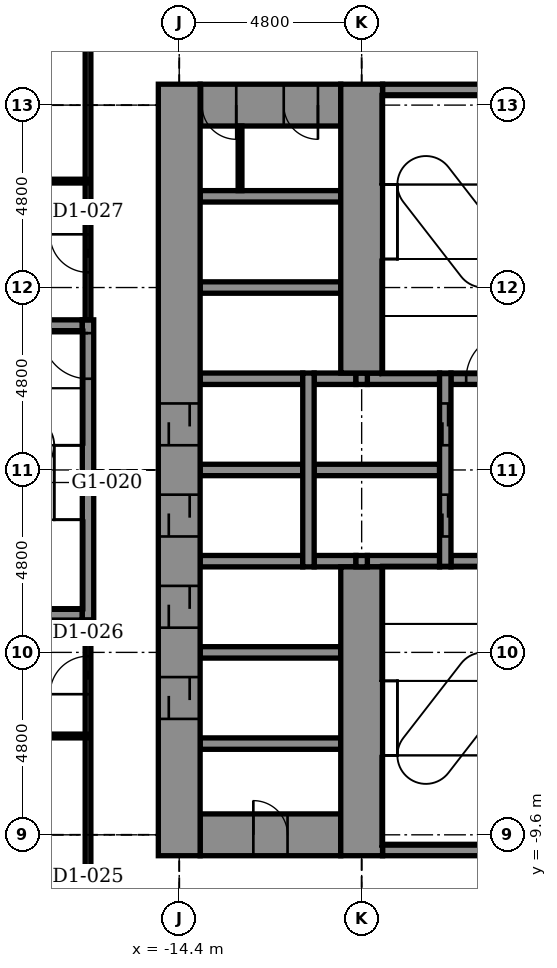
"""IFC4 building model, lengths in metres.
Left out: names, types, materials, properties, quantities, classifications, styles, units other than length and angle.
Written with IfcOpenShell. Run it as: python <this file> out.ifc"""

import sys

from ifc_helpers import new_model, si_unit, direction, frame, frame_2d, origin, place, context, subcontext, project, spatial, rectangle, extrude, element, fill, save


model = new_model("IFC4")
c1 = context("Model", 3, precision=1e-05, world=origin(), true_north=direction((0.0, 1.0)))
c2 = subcontext(c1, "Body", "Model", "MODEL_VIEW")
j1 = project(units=[si_unit("LENGTHUNIT", "METRE"), si_unit("PLANEANGLEUNIT", "RADIAN")], contexts=[c1])
p1 = place(None, origin())
s1 = spatial("IfcSite", under=j1, at=p1, CompositionType="ELEMENT")
p2 = place(p1, origin())
s2 = spatial("IfcBuilding", under=s1, at=p2, CompositionType="ELEMENT")
p3 = place(p2, frame((0.0, 0.0, 7.0)))
s3 = spatial("IfcBuildingStorey", under=s2, at=p3, CompositionType="ELEMENT", Elevation=7.0)
p4 = place(p3, frame((-9.05, -10.0, -0.3), z_axis=(0.0, 0.0, 1.0), x_axis=(1.0, 0.0, 0.0)))
e1 = element("IfcWall", 1, at=p4, inside=s3, PredefinedType="STANDARD", context=c2, shape_type="SweptSolid", body=[
    extrude(rectangle(XDim=3.8, YDim=0.3, at=frame_2d((1.9, 0.0))), origin(), (0.0, 0.0, 1.0), 5.4),
])
p5 = place(p3, frame((-13.85, -9.6, -0.3), z_axis=(0.0, 0.0, 1.0), x_axis=(1.0, 0.0, 0.0)))
e2 = element("IfcWall", 2, at=p5, inside=s3, PredefinedType="SHEAR", context=c2, shape_type="SweptSolid", body=[
    extrude(rectangle(XDim=3.7, YDim=1.1, at=frame_2d((1.85, 0.0))), origin(), (0.0, 0.0, 1.0), 5.4),
])
p6 = place(p5, frame((1.4, 0.0, 0.3)))
e3 = element("IfcOpeningElement", 3, at=p6, cuts=e2, PredefinedType="OPENING", context=c2, shape_type="SweptSolid", body=[
    extrude(rectangle(XDim=0.9, YDim=2.1, at=frame_2d((0.45, 1.05))), frame((0.0, 0.56, 0.0), z_axis=(0.0, -1.0, 0.0), x_axis=(1.0, 0.0, 0.0)), (0.0, 0.0, 1.0), 1.12),
])
for number, where, z_axis, x_axis in (
    (4, (-13.85, -7.2, -0.3), (0.0, 0.0, 1.0), (1.0, 0.0, 0.0)),
    (5, (-13.85, -4.8, -0.3), (0.0, 0.0, 1.0), (1.0, 0.0, 0.0)),
):
    element("IfcWall", number, at=place(p3, frame(where, z_axis=z_axis, x_axis=x_axis)), inside=s3, PredefinedType="STANDARD", context=c2, shape_type="SweptSolid", body=[
        extrude(rectangle(XDim=3.7, YDim=0.3, at=frame_2d((1.85, 0.0))), origin(), (0.0, 0.0, 1.0), 5.4),
    ])
p7 = place(p3, frame((-21.45, -3.8, -0.3), z_axis=(0.0, 0.0, 1.0), x_axis=(1.0, 0.0, 0.0)))
e6 = element("IfcWall", 6, at=p7, inside=s3, PredefinedType="STANDARD", context=c2, shape_type="SweptSolid", body=[
    extrude(rectangle(XDim=4.5, YDim=0.3, at=frame_2d((2.25, 0.0))), origin(), (0.0, 0.0, 1.0), 5.4),
])
p8 = place(p3, frame((-13.85, -2.4, -0.3), z_axis=(0.0, 0.0, 1.0), x_axis=(1.0, 0.0, 0.0)))
e7 = element("IfcWall", 7, at=p8, inside=s3, PredefinedType="STANDARD", context=c2, shape_type="SweptSolid", body=[
    extrude(rectangle(XDim=2.7, YDim=0.3, at=frame_2d((1.35, 0.0))), origin(), (0.0, 0.0, 1.0), 5.4),
])
p9 = place(p3, frame((-10.85, -2.4, -0.3), z_axis=(0.0, 0.0, 1.0), x_axis=(1.0, 0.0, 0.0)))
e8 = element("IfcWall", 8, at=p9, inside=s3, PredefinedType="STANDARD", context=c2, shape_type="SweptSolid", body=[
    extrude(rectangle(XDim=1.1, YDim=0.3, at=frame_2d((0.55, 0.0))), origin(), (0.0, 0.0, 1.0), 5.4),
])
p10 = place(p3, frame((-9.45, -2.4, -0.3), z_axis=(0.0, 0.0, 1.0), x_axis=(1.0, 0.0, 0.0)))
e9 = element("IfcWall", 9, at=p10, inside=s3, PredefinedType="STANDARD", context=c2, shape_type="SweptSolid", body=[
    extrude(rectangle(XDim=1.9, YDim=0.3, at=frame_2d((0.95, 0.0))), origin(), (0.0, 0.0, 1.0), 5.4),
])
p11 = place(p3, frame((-7.25, -2.4, -0.3), z_axis=(0.0, 0.0, 1.0), x_axis=(1.0, 0.0, 0.0)))
e10 = element("IfcWall", 10, at=p11, inside=s3, PredefinedType="STANDARD", context=c2, shape_type="SweptSolid", body=[
    extrude(rectangle(XDim=2.0, YDim=0.3, at=frame_2d((1.0, 0.0))), origin(), (0.0, 0.0, 1.0), 5.4),
])
p12 = place(p3, frame((-13.85, 0.0, -0.3), z_axis=(0.0, 0.0, 1.0), x_axis=(1.0, 0.0, 0.0)))
e11 = element("IfcWall", 11, at=p12, inside=s3, PredefinedType="STANDARD", context=c2, shape_type="SweptSolid", body=[
    extrude(rectangle(XDim=2.7, YDim=0.3, at=frame_2d((1.35, 0.0))), origin(), (0.0, 0.0, 1.0), 5.4),
])
p13 = place(p3, frame((-10.85, 0.0, -0.3), z_axis=(0.0, 0.0, 1.0), x_axis=(1.0, 0.0, 0.0)))
e12 = element("IfcWall", 12, at=p13, inside=s3, PredefinedType="STANDARD", context=c2, shape_type="SweptSolid", body=[
    extrude(rectangle(XDim=3.3, YDim=0.3, at=frame_2d((1.65, 0.0))), origin(), (0.0, 0.0, 1.0), 5.4),
])
p14 = place(p3, frame((-13.85, 2.4, -0.3), z_axis=(0.0, 0.0, 1.0), x_axis=(1.0, 0.0, 0.0)))
e13 = element("IfcWall", 13, at=p14, inside=s3, PredefinedType="STANDARD", context=c2, shape_type="SweptSolid", body=[
    extrude(rectangle(XDim=2.7, YDim=0.3, at=frame_2d((1.35, 0.0))), origin(), (0.0, 0.0, 1.0), 5.4),
])
p15 = place(p3, frame((-10.85, 2.4, -0.3), z_axis=(0.0, 0.0, 1.0), x_axis=(1.0, 0.0, 0.0)))
e14 = element("IfcWall", 14, at=p15, inside=s3, PredefinedType="STANDARD", context=c2, shape_type="SweptSolid", body=[
    extrude(rectangle(XDim=1.1, YDim=0.3, at=frame_2d((0.55, 0.0))), origin(), (0.0, 0.0, 1.0), 5.4),
])
p16 = place(p3, frame((-9.45, 2.4, -0.3), z_axis=(0.0, 0.0, 1.0), x_axis=(1.0, 0.0, 0.0)))
e15 = element("IfcWall", 15, at=p16, inside=s3, PredefinedType="STANDARD", context=c2, shape_type="SweptSolid", body=[
    extrude(rectangle(XDim=1.9, YDim=0.3, at=frame_2d((0.95, 0.0))), origin(), (0.0, 0.0, 1.0), 5.4),
])
p17 = place(p3, frame((-7.25, 2.4, -0.3), z_axis=(0.0, 0.0, 1.0), x_axis=(1.0, 0.0, 0.0)))
e16 = element("IfcWall", 16, at=p17, inside=s3, PredefinedType="STANDARD", context=c2, shape_type="SweptSolid", body=[
    extrude(rectangle(XDim=2.0, YDim=0.3, at=frame_2d((1.0, 0.0))), origin(), (0.0, 0.0, 1.0), 5.4),
])
p18 = place(p17, frame((0.4, 0.0, 0.3)))
e17 = element("IfcOpeningElement", 17, at=p18, cuts=e16, PredefinedType="OPENING", context=c2, shape_type="SweptSolid", body=[
    extrude(rectangle(XDim=1.2, YDim=2.1, at=frame_2d((0.6, 1.05))), frame((0.0, 0.16, 0.0), z_axis=(0.0, -1.0, 0.0), x_axis=(1.0, 0.0, 0.0)), (0.0, 0.0, 1.0), 0.32),
])
p19 = place(p3, frame((-21.45, 3.8, -0.3), z_axis=(0.0, 0.0, 1.0), x_axis=(1.0, 0.0, 0.0)))
e18 = element("IfcWall", 18, at=p19, inside=s3, PredefinedType="STANDARD", context=c2, shape_type="SweptSolid", body=[
    extrude(rectangle(XDim=4.5, YDim=0.3, at=frame_2d((2.25, 0.0))), origin(), (0.0, 0.0, 1.0), 5.4),
])
for number, where, z_axis, x_axis in (
    (19, (-13.85, 4.8, -0.3), (0.0, 0.0, 1.0), (1.0, 0.0, 0.0)),
    (20, (-13.85, 7.2, -0.3), (0.0, 0.0, 1.0), (1.0, 0.0, 0.0)),
):
    element("IfcWall", number, at=place(p3, frame(where, z_axis=z_axis, x_axis=x_axis)), inside=s3, PredefinedType="STANDARD", context=c2, shape_type="SweptSolid", body=[
        extrude(rectangle(XDim=3.7, YDim=0.3, at=frame_2d((1.85, 0.0))), origin(), (0.0, 0.0, 1.0), 5.4),
    ])
p20 = place(p3, frame((-13.85, 9.6, -0.3), z_axis=(0.0, 0.0, 1.0), x_axis=(1.0, 0.0, 0.0)))
e21 = element("IfcWall", 21, at=p20, inside=s3, PredefinedType="SHEAR", context=c2, shape_type="SweptSolid", body=[
    extrude(rectangle(XDim=3.7, YDim=1.1, at=frame_2d((1.85, 0.0))), origin(), (0.0, 0.0, 1.0), 5.4),
])
p21 = place(p20, frame((0.05, 0.0, 0.3)))
e22 = element("IfcOpeningElement", 22, at=p21, cuts=e21, PredefinedType="OPENING", context=c2, shape_type="SweptSolid", body=[
    extrude(rectangle(XDim=0.9, YDim=2.1, at=frame_2d((0.45, 1.05))), frame((0.0, 0.56, 0.0), z_axis=(0.0, -1.0, 0.0), x_axis=(1.0, 0.0, 0.0)), (0.0, 0.0, 1.0), 1.12),
])
p22 = place(p20, frame((2.2, 0.0, 0.3)))
e23 = element("IfcOpeningElement", 23, at=p22, cuts=e21, PredefinedType="OPENING", context=c2, shape_type="SweptSolid", body=[
    extrude(rectangle(XDim=0.9, YDim=2.1, at=frame_2d((0.45, 1.05))), frame((0.0, 0.56, 0.0), z_axis=(0.0, -1.0, 0.0), x_axis=(1.0, 0.0, 0.0)), (0.0, 0.0, 1.0), 1.12),
])
p23 = place(p3, frame((-9.05, 10.0, -0.3), z_axis=(0.0, 0.0, 1.0), x_axis=(1.0, 0.0, 0.0)))
e24 = element("IfcWall", 24, at=p23, inside=s3, PredefinedType="STANDARD", context=c2, shape_type="SweptSolid", body=[
    extrude(rectangle(XDim=3.8, YDim=0.3, at=frame_2d((1.9, 0.0))), origin(), (0.0, 0.0, 1.0), 5.4),
])
p24 = place(p3, frame((-16.8, -3.95, -0.3), z_axis=(0.0, 0.0, 1.0), x_axis=(0.0, 1.0, 0.0)))
e25 = element("IfcWall", 25, at=p24, inside=s3, PredefinedType="STANDARD", context=c2, shape_type="SweptSolid", body=[
    extrude(rectangle(XDim=7.9, YDim=0.3, at=frame_2d((3.95, 0.0))), origin(), (0.0, 0.0, 1.0), 5.4),
])
p25 = place(p24, frame((6.35, 0.0, 0.3)))
e26 = element("IfcOpeningElement", 26, at=p25, cuts=e25, PredefinedType="OPENING", context=c2, shape_type="SweptSolid", body=[
    extrude(rectangle(XDim=1.2, YDim=2.1, at=frame_2d((0.6, 1.05))), frame((0.0, 0.16, 0.0), z_axis=(0.0, -1.0, 0.0), x_axis=(1.0, 0.0, 0.0)), (0.0, 0.0, 1.0), 0.32),
])
p26 = place(p3, frame((-14.4, -10.15, -0.3), z_axis=(0.0, 0.0, 1.0), x_axis=(0.0, 1.0, 0.0)))
e27 = element("IfcWall", 27, at=p26, inside=s3, PredefinedType="SHEAR", context=c2, shape_type="SweptSolid", body=[
    extrude(rectangle(XDim=20.3, YDim=1.1, at=frame_2d((10.15, 0.0))), origin(), (0.0, 0.0, 1.0), 5.4),
])
p27 = place(p26, frame((3.6, 0.0, 0.3)))
e28 = element("IfcOpeningElement", 28, at=p27, cuts=e27, PredefinedType="OPENING", context=c2, shape_type="SweptSolid", body=[
    extrude(rectangle(XDim=1.1, YDim=2.1, at=frame_2d((0.55, 1.05))), frame((0.0, 0.56, 0.0), z_axis=(0.0, -1.0, 0.0), x_axis=(1.0, 0.0, 0.0)), (0.0, 0.0, 1.0), 1.12),
])
p28 = place(p26, frame((6.0, 0.0, 0.3)))
e29 = element("IfcOpeningElement", 29, at=p28, cuts=e27, PredefinedType="OPENING", context=c2, shape_type="SweptSolid", body=[
    extrude(rectangle(XDim=1.1, YDim=2.1, at=frame_2d((0.55, 1.05))), frame((0.0, 0.56, 0.0), z_axis=(0.0, -1.0, 0.0), x_axis=(1.0, 0.0, 0.0)), (0.0, 0.0, 1.0), 1.12),
])
p29 = place(p26, frame((8.4, 0.0, 0.3)))
e30 = element("IfcOpeningElement", 30, at=p29, cuts=e27, PredefinedType="OPENING", context=c2, shape_type="SweptSolid", body=[
    extrude(rectangle(XDim=1.1, YDim=2.1, at=frame_2d((0.55, 1.05))), frame((0.0, 0.56, 0.0), z_axis=(0.0, -1.0, 0.0), x_axis=(1.0, 0.0, 0.0)), (0.0, 0.0, 1.0), 1.12),
])
p30 = place(p26, frame((10.8, 0.0, 0.3)))
e31 = element("IfcOpeningElement", 31, at=p30, cuts=e27, PredefinedType="OPENING", context=c2, shape_type="SweptSolid", body=[
    extrude(rectangle(XDim=1.1, YDim=2.1, at=frame_2d((0.55, 1.05))), frame((0.0, 0.56, 0.0), z_axis=(0.0, -1.0, 0.0), x_axis=(1.0, 0.0, 0.0)), (0.0, 0.0, 1.0), 1.12),
])
p31 = place(p3, frame((-11.0, -2.55, -0.3), z_axis=(0.0, 0.0, 1.0), x_axis=(0.0, 1.0, 0.0)))
e32 = element("IfcWall", 32, at=p31, inside=s3, PredefinedType="STANDARD", context=c2, shape_type="SweptSolid", body=[
    extrude(rectangle(XDim=5.1, YDim=0.3, at=frame_2d((2.55, 0.0))), origin(), (0.0, 0.0, 1.0), 5.4),
])
p32 = place(p3, frame((-9.6, -10.15, -0.3), z_axis=(0.0, 0.0, 1.0), x_axis=(0.0, 1.0, 0.0)))
e33 = element("IfcWall", 33, at=p32, inside=s3, PredefinedType="SHEAR", context=c2, shape_type="SweptSolid", body=[
    extrude(rectangle(XDim=7.6, YDim=1.1, at=frame_2d((3.8, 0.0))), origin(), (0.0, 0.0, 1.0), 5.4),
])
for number, where, z_axis, x_axis in (
    (34, (-9.6, -2.55, -0.3), (0.0, 0.0, 1.0), (0.0, 1.0, 0.0)),
    (35, (-9.6, 2.25, -0.3), (0.0, 0.0, 1.0), (0.0, 1.0, 0.0)),
):
    element("IfcWall", number, at=place(p3, frame(where, z_axis=z_axis, x_axis=x_axis)), inside=s3, PredefinedType="STANDARD", context=c2, shape_type="SweptSolid", body=[
        extrude(rectangle(XDim=0.3, YDim=0.3, at=frame_2d((0.15, 0.0))), origin(), (0.0, 0.0, 1.0), 5.4),
    ])
p33 = place(p3, frame((-9.6, 2.55, -0.3), z_axis=(0.0, 0.0, 1.0), x_axis=(0.0, 1.0, 0.0)))
e36 = element("IfcWall", 36, at=p33, inside=s3, PredefinedType="SHEAR", context=c2, shape_type="SweptSolid", body=[
    extrude(rectangle(XDim=7.6, YDim=1.1, at=frame_2d((3.8, 0.0))), origin(), (0.0, 0.0, 1.0), 5.4),
])
p34 = place(p3, frame((-7.4, -2.55, -0.3), z_axis=(0.0, 0.0, 1.0), x_axis=(0.0, 1.0, 0.0)))
e37 = element("IfcWall", 37, at=p34, inside=s3, PredefinedType="STANDARD", context=c2, shape_type="SweptSolid", body=[
    extrude(rectangle(XDim=5.1, YDim=0.3, at=frame_2d((2.55, 0.0))), origin(), (0.0, 0.0, 1.0), 5.4),
])
p35 = place(p34, frame((0.8, 0.0, 0.3)))
e38 = element("IfcOpeningElement", 38, at=p35, cuts=e37, PredefinedType="OPENING", context=c2, shape_type="SweptSolid", body=[
    extrude(rectangle(XDim=1.1, YDim=2.1, at=frame_2d((0.55, 1.05))), frame((0.0, 0.16, 0.0), z_axis=(0.0, -1.0, 0.0), x_axis=(1.0, 0.0, 0.0)), (0.0, 0.0, 1.0), 0.32),
])
p36 = place(p34, frame((3.2, 0.0, 0.3)))
e39 = element("IfcOpeningElement", 39, at=p36, cuts=e37, PredefinedType="OPENING", context=c2, shape_type="SweptSolid", body=[
    extrude(rectangle(XDim=1.1, YDim=2.1, at=frame_2d((0.55, 1.05))), frame((0.0, 0.16, 0.0), z_axis=(0.0, -1.0, 0.0), x_axis=(1.0, 0.0, 0.0)), (0.0, 0.0, 1.0), 0.32),
])
p37 = place(p3, frame((-12.8, 7.35, 0.0), z_axis=(0.0, 0.0, 1.0), x_axis=(0.0, 1.0, 0.0)))
e40 = element("IfcWall", 40, at=p37, inside=s3, PredefinedType="PARTITIONING", context=c2, shape_type="SweptSolid", body=[
    extrude(rectangle(XDim=1.7, YDim=0.1, at=frame_2d((0.85, 0.0))), origin(), (0.0, 0.0, 1.0), 5.1),
])
p38 = place(p3, frame((-16.8, -13.6, 0.0), z_axis=(0.0, 0.0, 1.0), x_axis=(0.0, 1.0, 0.0)))
e41 = element("IfcWall", 41, at=p38, inside=s3, PredefinedType="PARTITIONING", context=c2, shape_type="SweptSolid", body=[
    extrude(rectangle(XDim=9.65, YDim=0.15, at=frame_2d((4.825, 0.0))), origin(), (0.0, 0.0, 1.0), 5.1),
])
p39 = place(p38, frame((1.3, 0.0, 0.0)))
e42 = element("IfcOpeningElement", 42, at=p39, cuts=e41, PredefinedType="OPENING", context=c2, shape_type="SweptSolid", body=[
    extrude(rectangle(XDim=1.0, YDim=2.1, at=frame_2d((0.5, 1.05))), frame((0.0, 0.085, 0.0), z_axis=(0.0, -1.0, 0.0), x_axis=(1.0, 0.0, 0.0)), (0.0, 0.0, 1.0), 0.17),
])
p40 = place(p38, frame((7.7, 0.0, 0.0)))
e43 = element("IfcOpeningElement", 43, at=p40, cuts=e41, PredefinedType="OPENING", context=c2, shape_type="SweptSolid", body=[
    extrude(rectangle(XDim=1.0, YDim=2.1, at=frame_2d((0.5, 1.05))), frame((0.0, 0.085, 0.0), z_axis=(0.0, -1.0, 0.0), x_axis=(1.0, 0.0, 0.0)), (0.0, 0.0, 1.0), 0.17),
])
p41 = place(p3, frame((-16.8, 3.95, 0.0), z_axis=(0.0, 0.0, 1.0), x_axis=(0.0, 1.0, 0.0)))
e44 = element("IfcWall", 44, at=p41, inside=s3, PredefinedType="PARTITIONING", context=c2, shape_type="SweptSolid", body=[
    extrude(rectangle(XDim=10.85, YDim=0.15, at=frame_2d((5.425, 0.0))), origin(), (0.0, 0.0, 1.0), 5.1),
])
p42 = place(p41, frame((1.25, 0.0, 0.0)))
e45 = element("IfcOpeningElement", 45, at=p42, cuts=e44, PredefinedType="OPENING", context=c2, shape_type="SweptSolid", body=[
    extrude(rectangle(XDim=1.0, YDim=2.1, at=frame_2d((0.5, 1.05))), frame((0.0, 0.085, 0.0), z_axis=(0.0, -1.0, 0.0), x_axis=(1.0, 0.0, 0.0)), (0.0, 0.0, 1.0), 0.17),
])
p43 = place(p41, frame((7.95, 0.0, 0.0)))
e46 = element("IfcOpeningElement", 46, at=p43, cuts=e44, PredefinedType="OPENING", context=c2, shape_type="SweptSolid", body=[
    extrude(rectangle(XDim=1.0, YDim=2.1, at=frame_2d((0.5, 1.05))), frame((0.0, 0.085, 0.0), z_axis=(0.0, -1.0, 0.0), x_axis=(1.0, 0.0, 0.0)), (0.0, 0.0, 1.0), 0.17),
])
p44 = place(p3, frame((-48.62, -7.0, 0.0), z_axis=(0.0, 0.0, 1.0), x_axis=(1.0, 0.0, 0.0)))
e47 = element("IfcWall", 47, at=p44, inside=s3, PredefinedType="PARTITIONING", context=c2, shape_type="SweptSolid", body=[
    extrude(rectangle(XDim=31.82, YDim=0.1, at=frame_2d((15.91, 0.0))), origin(), (0.0, 0.0, 1.0), 5.1),
])
p45 = place(p3, frame((-44.286, 7.6, 0.0), z_axis=(0.0, 0.0, 1.0), x_axis=(1.0, 0.0, 0.0)))
e48 = element("IfcWall", 48, at=p45, inside=s3, PredefinedType="PARTITIONING", context=c2, shape_type="SweptSolid", body=[
    extrude(rectangle(XDim=27.486, YDim=0.1, at=frame_2d((13.743, 0.0))), origin(), (0.0, 0.0, 1.0), 5.1),
])
p46 = place(p40, origin())
e49 = element("IfcDoor", 49, at=p46, inside=s3, OperationType="SINGLE_SWING_LEFT", PredefinedType="DOOR", context=c2, shape_type="SweptSolid", body=[
    extrude(rectangle(XDim=1.0, YDim=2.1, at=frame_2d((0.5, 1.05))), frame((0.0, 0.025, 0.0), z_axis=(0.0, -1.0, 0.0), x_axis=(1.0, 0.0, 0.0)), (0.0, 0.0, 1.0), 0.05),
])
fill(e43, e49)
p47 = place(p42, origin())
e50 = element("IfcDoor", 50, at=p47, inside=s3, OperationType="SINGLE_SWING_RIGHT", PredefinedType="DOOR", context=c2, shape_type="SweptSolid", body=[
    extrude(rectangle(XDim=1.0, YDim=2.1, at=frame_2d((0.5, 1.05))), frame((0.0, 0.025, 0.0), z_axis=(0.0, -1.0, 0.0), x_axis=(1.0, 0.0, 0.0)), (0.0, 0.0, 1.0), 0.05),
])
fill(e45, e50)
p48 = place(p35, origin())
e51 = element("IfcDoor", 51, at=p48, inside=s3, OperationType="DOUBLE_DOOR_SLIDING", PredefinedType="DOOR", context=c2, shape_type="SweptSolid", body=[
    extrude(rectangle(XDim=1.1, YDim=2.1, at=frame_2d((0.55, 1.05))), frame((0.0, 0.025, 0.0), z_axis=(0.0, -1.0, 0.0), x_axis=(1.0, 0.0, 0.0)), (0.0, 0.0, 1.0), 0.05),
])
fill(e38, e51)
p49 = place(p36, origin())
e52 = element("IfcDoor", 52, at=p49, inside=s3, OperationType="DOUBLE_DOOR_SLIDING", PredefinedType="DOOR", context=c2, shape_type="SweptSolid", body=[
    extrude(rectangle(XDim=1.1, YDim=2.1, at=frame_2d((0.55, 1.05))), frame((0.0, 0.025, 0.0), z_axis=(0.0, -1.0, 0.0), x_axis=(1.0, 0.0, 0.0)), (0.0, 0.0, 1.0), 0.05),
])
fill(e39, e52)
p50 = place(p27, origin())
e53 = element("IfcDoor", 53, at=p50, inside=s3, OperationType="DOUBLE_DOOR_SLIDING", PredefinedType="DOOR", context=c2, shape_type="SweptSolid", body=[
    extrude(rectangle(XDim=1.1, YDim=2.1, at=frame_2d((0.55, 1.05))), frame((0.0, 0.025, 0.0), z_axis=(0.0, -1.0, 0.0), x_axis=(1.0, 0.0, 0.0)), (0.0, 0.0, 1.0), 0.05),
])
fill(e28, e53)
p51 = place(p28, origin())
e54 = element("IfcDoor", 54, at=p51, inside=s3, OperationType="DOUBLE_DOOR_SLIDING", PredefinedType="DOOR", context=c2, shape_type="SweptSolid", body=[
    extrude(rectangle(XDim=1.1, YDim=2.1, at=frame_2d((0.55, 1.05))), frame((0.0, 0.025, 0.0), z_axis=(0.0, -1.0, 0.0), x_axis=(1.0, 0.0, 0.0)), (0.0, 0.0, 1.0), 0.05),
])
fill(e29, e54)
p52 = place(p29, origin())
e55 = element("IfcDoor", 55, at=p52, inside=s3, OperationType="DOUBLE_DOOR_SLIDING", PredefinedType="DOOR", context=c2, shape_type="SweptSolid", body=[
    extrude(rectangle(XDim=1.1, YDim=2.1, at=frame_2d((0.55, 1.05))), frame((0.0, 0.025, 0.0), z_axis=(0.0, -1.0, 0.0), x_axis=(1.0, 0.0, 0.0)), (0.0, 0.0, 1.0), 0.05),
])
fill(e30, e55)
p53 = place(p30, origin())
e56 = element("IfcDoor", 56, at=p53, inside=s3, OperationType="DOUBLE_DOOR_SLIDING", PredefinedType="DOOR", context=c2, shape_type="SweptSolid", body=[
    extrude(rectangle(XDim=1.1, YDim=2.1, at=frame_2d((0.55, 1.05))), frame((0.0, 0.025, 0.0), z_axis=(0.0, -1.0, 0.0), x_axis=(1.0, 0.0, 0.0)), (0.0, 0.0, 1.0), 0.05),
])
fill(e31, e56)
p54 = place(p25, origin())
e57 = element("IfcDoor", 57, at=p54, inside=s3, OperationType="SINGLE_SWING_RIGHT", PredefinedType="DOOR", context=c2, shape_type="SweptSolid", body=[
    extrude(rectangle(XDim=1.2, YDim=2.1, at=frame_2d((0.6, 1.05))), frame((0.0, 0.025, 0.0), z_axis=(0.0, -1.0, 0.0), x_axis=(1.0, 0.0, 0.0)), (0.0, 0.0, 1.0), 0.05),
])
fill(e26, e57)
p55 = place(p6, origin())
e58 = element("IfcDoor", 58, at=p55, inside=s3, OperationType="SINGLE_SWING_LEFT", PredefinedType="DOOR", context=c2, shape_type="SweptSolid", body=[
    extrude(rectangle(XDim=0.9, YDim=2.1, at=frame_2d((0.45, 1.05))), frame((0.0, 0.025, 0.0), z_axis=(0.0, -1.0, 0.0), x_axis=(1.0, 0.0, 0.0)), (0.0, 0.0, 1.0), 0.05),
])
fill(e3, e58)
p56 = place(p21, frame((0.9, 0.0, 0.0), z_axis=(0.0, 0.0, 1.0), x_axis=(-1.0, 0.0, 0.0)))
e59 = element("IfcDoor", 59, at=p56, inside=s3, OperationType="SINGLE_SWING_RIGHT", PredefinedType="DOOR", context=c2, shape_type="SweptSolid", body=[
    extrude(rectangle(XDim=0.9, YDim=2.1, at=frame_2d((0.45, 1.05))), frame((0.0, 0.025, 0.0), z_axis=(0.0, -1.0, 0.0), x_axis=(1.0, 0.0, 0.0)), (0.0, 0.0, 1.0), 0.05),
])
fill(e22, e59)
p57 = place(p22, frame((0.9, 0.0, 0.0), z_axis=(0.0, 0.0, 1.0), x_axis=(-1.0, 0.0, 0.0)))
e60 = element("IfcDoor", 60, at=p57, inside=s3, OperationType="SINGLE_SWING_RIGHT", PredefinedType="DOOR", context=c2, shape_type="SweptSolid", body=[
    extrude(rectangle(XDim=0.9, YDim=2.1, at=frame_2d((0.45, 1.05))), frame((0.0, 0.025, 0.0), z_axis=(0.0, -1.0, 0.0), x_axis=(1.0, 0.0, 0.0)), (0.0, 0.0, 1.0), 0.05),
])
fill(e23, e60)
p58 = place(p18, origin())
e61 = element("IfcDoor", 61, at=p58, inside=s3, OperationType="SINGLE_SWING_RIGHT", PredefinedType="DOOR", context=c2, shape_type="SweptSolid", body=[
    extrude(rectangle(XDim=1.2, YDim=2.1, at=frame_2d((0.6, 1.05))), frame((0.0, 0.025, 0.0), z_axis=(0.0, -1.0, 0.0), x_axis=(1.0, 0.0, 0.0)), (0.0, 0.0, 1.0), 0.05),
])
fill(e17, e61)
save(model, sys.argv[1])
